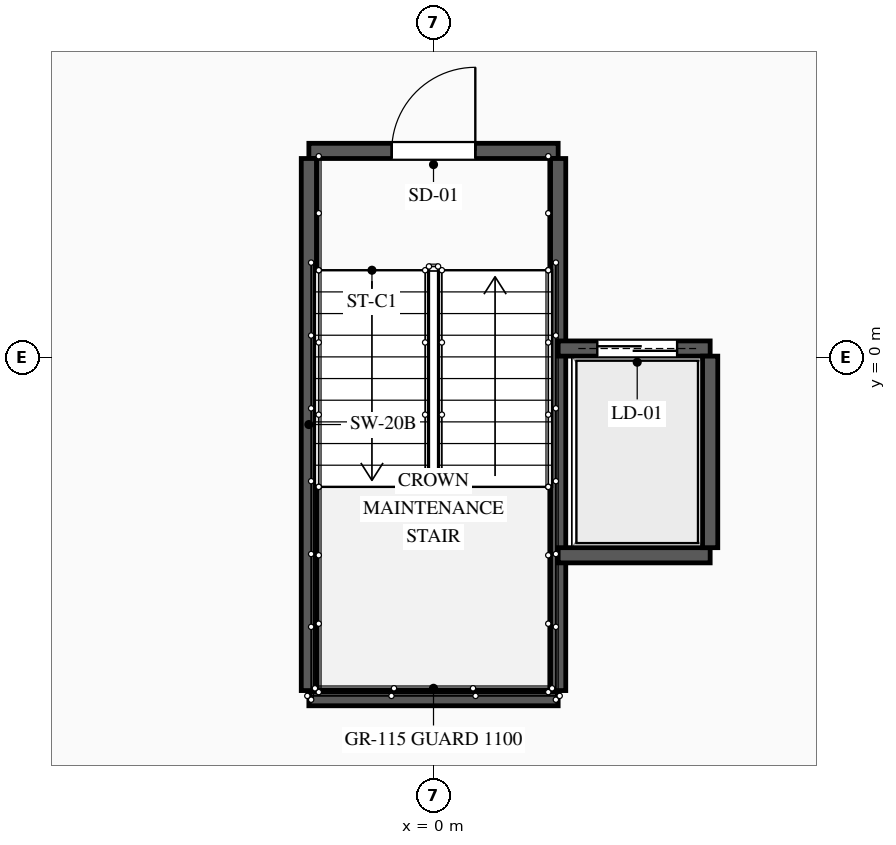
"""IFC4 building model, lengths in metres.
Left out: names, types, materials, properties, quantities, classifications, styles, units other than length and angle.
Written with IfcOpenShell. Run it as: python <this file> out.ifc"""

import sys

from ifc_helpers import new_model, si_unit, direction, frame, frame_2d, origin, place, context, subcontext, project, spatial, rectangle, extrude, element, fill, save


model = new_model("IFC4")
c1 = context("Model", 3, precision=1e-05, world=origin(), true_north=direction((0.0, 1.0)))
c2 = subcontext(c1, "Body", "Model", "MODEL_VIEW")
j1 = project(units=[si_unit("LENGTHUNIT", "METRE"), si_unit("PLANEANGLEUNIT", "RADIAN")], contexts=[c1])
p1 = place(None, origin())
s1 = spatial("IfcSite", under=j1, at=p1, CompositionType="ELEMENT")
p2 = place(p1, origin())
s2 = spatial("IfcBuilding", under=s1, at=p2, CompositionType="ELEMENT")
p3 = place(p2, frame((0.0, 0.0, 285.4)))
s3 = spatial("IfcBuildingStorey", under=s2, at=p3, CompositionType="ELEMENT", Elevation=285.4)
p4 = place(p3, frame((-1.64, 2.72, 0.0), z_axis=(0.0, 0.0, 1.0), x_axis=(1.0, 0.0, 0.0)))
e1 = element("IfcWall", 1, at=p4, inside=s3, PredefinedType="SHEAR", context=c2, shape_type="SweptSolid", body=[
    extrude(rectangle(XDim=3.28, YDim=0.2, at=frame_2d((1.64, 0.0))), origin(), (0.0, 0.0, 1.0), 3.4),
])
p5 = place(p4, frame((1.09, 0.0, 0.0)))
e2 = element("IfcOpeningElement", 2, at=p5, cuts=e1, PredefinedType="OPENING", context=c2, shape_type="SweptSolid", body=[
    extrude(rectangle(XDim=1.1, YDim=2.15, at=frame_2d((0.55, 1.075))), frame((0.0, 0.11, 0.0), z_axis=(0.0, -1.0, 0.0), x_axis=(1.0, 0.0, 0.0)), (0.0, 0.0, 1.0), 0.22),
])
p6 = place(p3, frame((-1.64, -4.48, 0.0), z_axis=(0.0, 0.0, 1.0), x_axis=(1.0, 0.0, 0.0)))
e3 = element("IfcWall", 3, at=p6, inside=s3, PredefinedType="SHEAR", context=c2, shape_type="SweptSolid", body=[
    extrude(rectangle(XDim=3.28, YDim=0.2, at=frame_2d((1.64, 0.0))), origin(), (0.0, 0.0, 1.0), 3.4),
])
for number, where, z_axis, x_axis in (
    (4, (-1.64, -4.38, 0.0), (0.0, 0.0, 1.0), (0.0, 1.0, 0.0)),
    (5, (1.64, -4.38, 0.0), (0.0, 0.0, 1.0), (0.0, 1.0, 0.0)),
):
    element("IfcWall", number, at=place(p3, frame(where, z_axis=z_axis, x_axis=x_axis)), inside=s3, PredefinedType="SHEAR", context=c2, shape_type="SweptSolid", body=[
        extrude(rectangle(XDim=7.0, YDim=0.2, at=frame_2d((3.5, 0.0))), origin(), (0.0, 0.0, 1.0), 3.4),
    ])
p7 = place(p3, frame((1.64, 0.12, 0.0), z_axis=(0.0, 0.0, 1.0), x_axis=(1.0, 0.0, 0.0)))
e6 = element("IfcWall", 6, at=p7, inside=s3, PredefinedType="SHEAR", context=c2, shape_type="SweptSolid", body=[
    extrude(rectangle(XDim=2.0, YDim=0.2, at=frame_2d((1.0, 0.0))), origin(), (0.0, 0.0, 1.0), 3.4),
])
p8 = place(p7, frame((0.515, 0.0, 0.0)))
e7 = element("IfcOpeningElement", 7, at=p8, cuts=e6, PredefinedType="OPENING", context=c2, shape_type="SweptSolid", body=[
    extrude(rectangle(XDim=1.05, YDim=2.1, at=frame_2d((0.525, 1.05))), frame((0.0, 0.11, 0.0), z_axis=(0.0, -1.0, 0.0), x_axis=(1.0, 0.0, 0.0)), (0.0, 0.0, 1.0), 0.22),
])
p9 = place(p3, frame((1.64, -2.6, 0.0), z_axis=(0.0, 0.0, 1.0), x_axis=(1.0, 0.0, 0.0)))
e8 = element("IfcWall", 8, at=p9, inside=s3, PredefinedType="SHEAR", context=c2, shape_type="SweptSolid", body=[
    extrude(rectangle(XDim=2.0, YDim=0.2, at=frame_2d((1.0, 0.0))), origin(), (0.0, 0.0, 1.0), 3.4),
])
p10 = place(p3, frame((3.64, -2.5, 0.0), z_axis=(0.0, 0.0, 1.0), x_axis=(0.0, 1.0, 0.0)))
e9 = element("IfcWall", 9, at=p10, inside=s3, PredefinedType="SHEAR", context=c2, shape_type="SweptSolid", body=[
    extrude(rectangle(XDim=2.52, YDim=0.2, at=frame_2d((1.26, 0.0))), origin(), (0.0, 0.0, 1.0), 3.4),
])
p11 = place(p5, origin())
e10 = element("IfcDoor", 10, at=p11, inside=s3, OperationType="SINGLE_SWING_RIGHT", PredefinedType="DOOR", context=c2, shape_type="SweptSolid", body=[
    extrude(rectangle(XDim=1.1, YDim=2.15, at=frame_2d((0.55, 1.075))), frame((0.0, 0.025, 0.0), z_axis=(0.0, -1.0, 0.0), x_axis=(1.0, 0.0, 0.0)), (0.0, 0.0, 1.0), 0.05),
])
fill(e2, e10)
p12 = place(p8, origin())
e11 = element("IfcDoor", 11, at=p12, inside=s3, OperationType="DOUBLE_DOOR_SLIDING", PredefinedType="DOOR", context=c2, shape_type="SweptSolid", body=[
    extrude(rectangle(XDim=1.05, YDim=2.1, at=frame_2d((0.525, 1.05))), frame((0.0, 0.025, 0.0), z_axis=(0.0, -1.0, 0.0), x_axis=(1.0, 0.0, 0.0)), (0.0, 0.0, 1.0), 0.05),
])
fill(e7, e11)
save(model, sys.argv[1])
